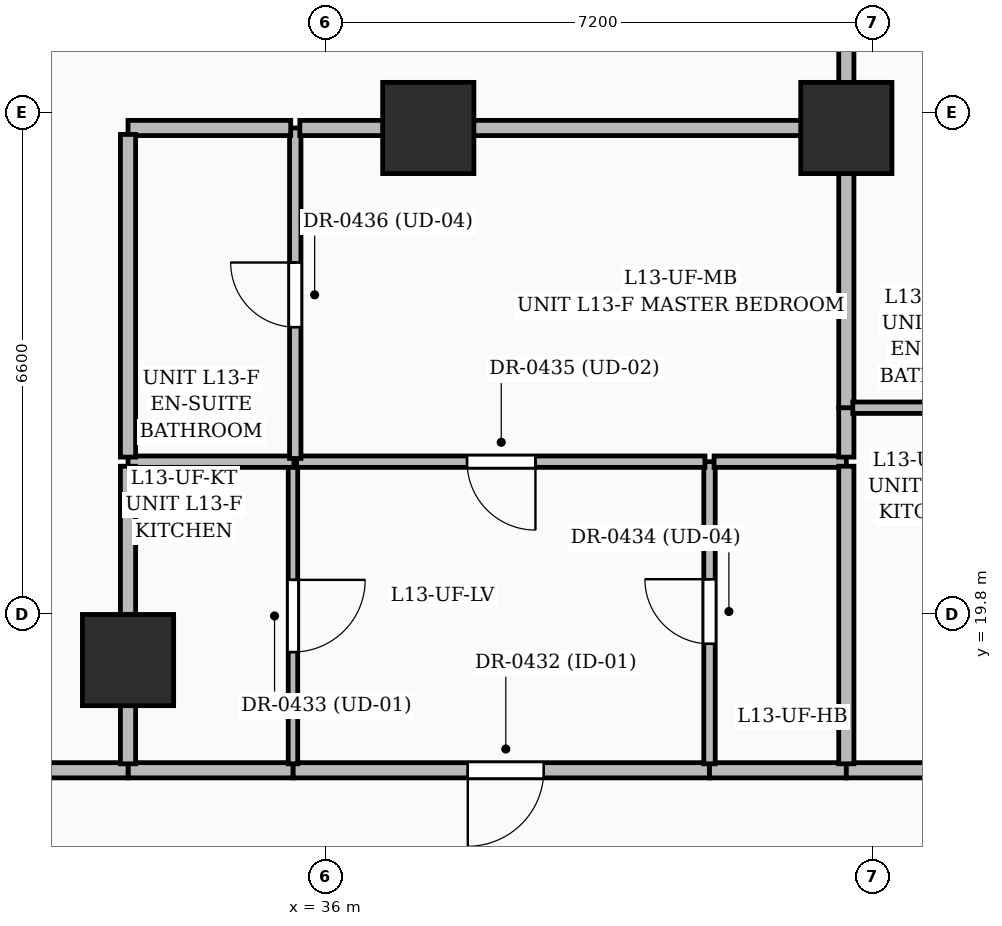
"""IFC4 building model, lengths in metres.
Left out: names, types, materials, properties, quantities, classifications, styles, units other than length and angle.
Written with IfcOpenShell. Run it as: python <this file> out.ifc"""

import sys

from ifc_helpers import new_model, si_unit, direction, frame, frame_2d, origin, origin_2d, place, context, subcontext, project, spatial, rectangle, extrude, element, fill, save


model = new_model("IFC4")
c1 = context("Model", 3, precision=1e-05, world=origin(), true_north=direction((0.0, 1.0)))
c2 = subcontext(c1, "Body", "Model", "MODEL_VIEW")
j1 = project(units=[si_unit("LENGTHUNIT", "METRE"), si_unit("PLANEANGLEUNIT", "RADIAN")], contexts=[c1])
p1 = place(None, origin())
s1 = spatial("IfcSite", under=j1, at=p1, CompositionType="ELEMENT")
p2 = place(p1, origin())
s2 = spatial("IfcBuilding", under=s1, at=p2, CompositionType="ELEMENT")
p3 = place(p2, frame((0.0, 0.0, 57.0)))
s3 = spatial("IfcBuildingStorey", under=s2, at=p3, CompositionType="ELEMENT", Elevation=57.0)
for number, where, z_axis, x_axis in (
    (1, (42.85, 26.2, 0.0), (0.0, 0.0, 1.0), (1.0, 0.0, 0.0)),
    (2, (37.35, 26.2, 0.0), (0.0, 0.0, 1.0), (1.0, 0.0, 0.0)),
    (3, (33.4, 19.2, 0.0), (0.0, 0.0, 1.0), (1.0, 0.0, 0.0)),
):
    element("IfcColumn", number, at=place(p3, frame(where, z_axis=z_axis, x_axis=x_axis)), inside=s3, PredefinedType="COLUMN", context=c2, shape_type="SweptSolid", body=[
        extrude(rectangle(XDim=1.2, YDim=1.2, at=origin_2d()), origin(), (0.0, 0.0, 1.0), 3.6),
    ])
p4 = place(p3, frame((41.05, 17.75, 0.0), z_axis=(0.0, 0.0, 1.0), x_axis=(-1.0, 0.0, 0.0)))
e4 = element("IfcWall", 4, at=p4, inside=s3, PredefinedType="PARTITIONING", context=c2, shape_type="SweptSolid", body=[
    extrude(rectangle(XDim=5.48, YDim=0.2, at=frame_2d((2.74, 0.0))), origin(), (0.0, 0.0, 1.0), 3.35),
])
p5 = place(p4, frame((2.18, 0.0, 0.0)))
e5 = element("IfcOpeningElement", 5, at=p5, cuts=e4, PredefinedType="OPENING", context=c2, shape_type="SweptSolid", body=[
    extrude(rectangle(XDim=1.0, YDim=2.2, at=frame_2d((0.5, 1.1))), frame((0.0, 0.11, 0.0), z_axis=(0.0, -1.0, 0.0), x_axis=(1.0, 0.0, 0.0)), (0.0, 0.0, 1.0), 0.22),
])
p6 = place(p3, frame((42.85, 17.75, 0.0), z_axis=(0.0, 0.0, 1.0), x_axis=(-1.0, 0.0, 0.0)))
e6 = element("IfcWall", 6, at=p6, inside=s3, PredefinedType="PARTITIONING", context=c2, shape_type="SweptSolid", body=[
    extrude(rectangle(XDim=1.8, YDim=0.2, at=frame_2d((0.9, 0.0))), origin(), (0.0, 0.0, 1.0), 3.35),
])
p7 = place(p3, frame((35.57, 17.75, 0.0), z_axis=(0.0, 0.0, 1.0), x_axis=(-1.0, 0.0, 0.0)))
e7 = element("IfcWall", 7, at=p7, inside=s3, PredefinedType="PARTITIONING", context=c2, shape_type="SweptSolid", body=[
    extrude(rectangle(XDim=2.17, YDim=0.2, at=frame_2d((1.085, 0.0))), origin(), (0.0, 0.0, 1.0), 2.309),
])
p8 = place(p3, frame((45.88, 17.75, 0.0), z_axis=(0.0, 0.0, 1.0), x_axis=(-1.0, 0.0, 0.0)))
e8 = element("IfcWall", 8, at=p8, inside=s3, PredefinedType="PARTITIONING", context=c2, shape_type="SweptSolid", body=[
    extrude(rectangle(XDim=3.03, YDim=0.2, at=frame_2d((1.515, 0.0))), origin(), (0.0, 0.0, 1.0), 2.309),
])
p9 = place(p3, frame((33.4, 17.75, 0.0), z_axis=(0.0, 0.0, 1.0), x_axis=(-1.0, 0.0, 0.0)))
e9 = element("IfcWall", 9, at=p9, inside=s3, PredefinedType="PARTITIONING", context=c2, shape_type="SweptSolid", body=[
    extrude(rectangle(XDim=11.915, YDim=0.2, at=frame_2d((5.958, 0.0))), origin(), (0.0, 0.0, 1.0), 2.279),
])
p10 = place(p9, frame((5.49, 0.0, 0.0)))
e10 = element("IfcOpeningElement", 10, at=p10, cuts=e9, PredefinedType="OPENING", context=c2, shape_type="SweptSolid", body=[
    extrude(rectangle(XDim=0.9, YDim=2.1, at=frame_2d((0.45, 1.05))), frame((0.0, 0.11, 0.0), z_axis=(0.0, -1.0, 0.0), x_axis=(1.0, 0.0, 0.0)), (0.0, 0.0, 1.0), 0.22),
])
p11 = place(p3, frame((41.05, 17.835, 0.0), z_axis=(0.0, 0.0, 1.0), x_axis=(0.0, 1.0, 0.0)))
e11 = element("IfcWall", 11, at=p11, inside=s3, PredefinedType="PARTITIONING", context=c2, shape_type="SweptSolid", body=[
    extrude(rectangle(XDim=3.975, YDim=0.15, at=frame_2d((1.988, 0.0))), origin(), (0.0, 0.0, 1.0), 2.853),
])
p12 = place(p11, frame((1.579, 0.0, 0.0)))
e12 = element("IfcOpeningElement", 12, at=p12, cuts=e11, PredefinedType="OPENING", context=c2, shape_type="SweptSolid", body=[
    extrude(rectangle(XDim=0.85, YDim=2.1, at=frame_2d((0.425, 1.05))), frame((0.0, 0.085, 0.0), z_axis=(0.0, -1.0, 0.0), x_axis=(1.0, 0.0, 0.0)), (0.0, 0.0, 1.0), 0.17),
])
p13 = place(p3, frame((35.57, 21.81, 0.0), z_axis=(0.0, 0.0, 1.0), x_axis=(0.0, -1.0, 0.0)))
e13 = element("IfcWall", 13, at=p13, inside=s3, PredefinedType="PARTITIONING", context=c2, shape_type="SweptSolid", body=[
    extrude(rectangle(XDim=3.975, YDim=0.125, at=frame_2d((1.988, 0.0))), origin(), (0.0, 0.0, 1.0), 2.853),
])
p14 = place(p13, frame((1.555, 0.0, 0.0)))
e14 = element("IfcOpeningElement", 14, at=p14, cuts=e13, PredefinedType="OPENING", context=c2, shape_type="SweptSolid", body=[
    extrude(rectangle(XDim=0.95, YDim=2.2, at=frame_2d((0.475, 1.1))), frame((0.0, 0.072, 0.0), z_axis=(0.0, -1.0, 0.0), x_axis=(1.0, 0.0, 0.0)), (0.0, 0.0, 1.0), 0.145),
])
p15 = place(p3, frame((40.99, 21.81, 0.0), z_axis=(0.0, 0.0, 1.0), x_axis=(-1.0, 0.0, 0.0)))
e15 = element("IfcWall", 15, at=p15, inside=s3, PredefinedType="PARTITIONING", context=c2, shape_type="SweptSolid", body=[
    extrude(rectangle(XDim=5.373, YDim=0.15, at=frame_2d((2.686, 0.0))), origin(), (0.0, 0.0, 1.0), 3.35),
])
p16 = place(p15, frame((2.23, 0.0, 0.0)))
e16 = element("IfcOpeningElement", 16, at=p16, cuts=e15, PredefinedType="OPENING", context=c2, shape_type="SweptSolid", body=[
    extrude(rectangle(XDim=0.9, YDim=2.15, at=frame_2d((0.45, 1.075))), frame((0.0, 0.085, 0.0), z_axis=(0.0, -1.0, 0.0), x_axis=(1.0, 0.0, 0.0)), (0.0, 0.0, 1.0), 0.17),
])
p17 = place(p3, frame((42.85, 21.81, 0.0), z_axis=(0.0, 0.0, 1.0), x_axis=(-1.0, 0.0, 0.0)))
e17 = element("IfcWall", 17, at=p17, inside=s3, PredefinedType="PARTITIONING", context=c2, shape_type="SweptSolid", body=[
    extrude(rectangle(XDim=1.74, YDim=0.15, at=frame_2d((0.87, 0.0))), origin(), (0.0, 0.0, 1.0), 3.35),
])
p18 = place(p3, frame((42.85, 17.835, 0.0), z_axis=(0.0, 0.0, 1.0), x_axis=(0.0, 1.0, 0.0)))
e18 = element("IfcWall", 18, at=p18, inside=s3, PredefinedType="PARTITIONING", context=c2, shape_type="SweptSolid", body=[
    extrude(rectangle(XDim=3.915, YDim=0.2, at=frame_2d((1.958, 0.0))), origin(), (0.0, 0.0, 1.0), 2.853),
])
p19 = place(p3, frame((35.583, 21.81, 0.0), z_axis=(0.0, 0.0, 1.0), x_axis=(-1.0, 0.0, 0.0)))
e19 = element("IfcWall", 19, at=p19, inside=s3, PredefinedType="PARTITIONING", context=c2, shape_type="SweptSolid", body=[
    extrude(rectangle(XDim=2.183, YDim=0.15, at=frame_2d((1.091, 0.0))), origin(), (0.0, 0.0, 1.0), 2.309),
])
p20 = place(p3, frame((33.4, 21.75, 0.0), z_axis=(0.0, 0.0, 1.0), x_axis=(0.0, -1.0, 0.0)))
e20 = element("IfcWall", 20, at=p20, inside=s3, PredefinedType="PARTITIONING", context=c2, shape_type="SweptSolid", body=[
    extrude(rectangle(XDim=3.915, YDim=0.2, at=frame_2d((1.958, 0.0))), origin(), (0.0, 0.0, 1.0), 2.309),
])
p21 = place(p3, frame((35.6, 21.853, 0.0), z_axis=(0.0, 0.0, 1.0), x_axis=(0.0, 1.0, 0.0)))
e21 = element("IfcWall", 21, at=p21, inside=s3, PredefinedType="PARTITIONING", context=c2, shape_type="SweptSolid", body=[
    extrude(rectangle(XDim=4.347, YDim=0.15, at=frame_2d((2.174, 0.0))), origin(), (0.0, 0.0, 1.0), 2.309),
])
p22 = place(p21, frame((1.728, 0.0, 0.0)))
e22 = element("IfcOpeningElement", 22, at=p22, cuts=e21, PredefinedType="OPENING", context=c2, shape_type="SweptSolid", body=[
    extrude(rectangle(XDim=0.85, YDim=2.1, at=frame_2d((0.425, 1.05))), frame((0.0, 0.085, 0.0), z_axis=(0.0, -1.0, 0.0), x_axis=(1.0, 0.0, 0.0)), (0.0, 0.0, 1.0), 0.17),
])
p23 = place(p3, frame((42.85, 21.87, 0.0), z_axis=(0.0, 0.0, 1.0), x_axis=(0.0, 1.0, 0.0)))
e23 = element("IfcWall", 23, at=p23, inside=s3, PredefinedType="PARTITIONING", context=c2, shape_type="SweptSolid", body=[
    extrude(rectangle(XDim=0.65, YDim=0.2, at=frame_2d((0.325, 0.0))), origin(), (0.0, 0.0, 1.0), 3.35),
])
p24 = place(p3, frame((42.85, 22.52, 0.0), z_axis=(0.0, 0.0, 1.0), x_axis=(0.0, 1.0, 0.0)))
e24 = element("IfcWall", 24, at=p24, inside=s3, PredefinedType="PARTITIONING", context=c2, shape_type="SweptSolid", body=[
    extrude(rectangle(XDim=3.68, YDim=0.2, at=frame_2d((1.84, 0.0))), origin(), (0.0, 0.0, 1.0), 2.309),
])
p25 = place(p3, frame((42.765, 26.2, 0.0), z_axis=(0.0, 0.0, 1.0), x_axis=(-1.0, 0.0, 0.0)))
e25 = element("IfcWall", 25, at=p25, inside=s3, PredefinedType="PARTITIONING", context=c2, shape_type="SweptSolid", body=[
    extrude(rectangle(XDim=7.105, YDim=0.2, at=frame_2d((3.552, 0.0))), origin(), (0.0, 0.0, 1.0), 2.309),
])
p26 = place(p3, frame((35.54, 26.2, 0.0), z_axis=(0.0, 0.0, 1.0), x_axis=(-1.0, 0.0, 0.0)))
e26 = element("IfcWall", 26, at=p26, inside=s3, PredefinedType="PARTITIONING", context=c2, shape_type="SweptSolid", body=[
    extrude(rectangle(XDim=2.14, YDim=0.2, at=frame_2d((1.07, 0.0))), origin(), (0.0, 0.0, 1.0), 2.709),
])
p27 = place(p3, frame((33.4, 26.115, 0.0), z_axis=(0.0, 0.0, 1.0), x_axis=(0.0, -1.0, 0.0)))
e27 = element("IfcWall", 27, at=p27, inside=s3, PredefinedType="PARTITIONING", context=c2, shape_type="SweptSolid", body=[
    extrude(rectangle(XDim=4.245, YDim=0.2, at=frame_2d((2.123, 0.0))), origin(), (0.0, 0.0, 1.0), 2.709),
])
p28 = place(p3, frame((45.09, 22.52, 0.0), z_axis=(0.0, 0.0, 1.0), x_axis=(-1.0, 0.0, 0.0)))
e28 = element("IfcWall", 28, at=p28, inside=s3, PredefinedType="PARTITIONING", context=c2, shape_type="SweptSolid", body=[
    extrude(rectangle(XDim=2.155, YDim=0.15, at=frame_2d((1.078, 0.0))), origin(), (0.0, 0.0, 1.0), 2.309),
])
p29 = place(p3, frame((42.85, 27.69, 0.0), z_axis=(0.0, 0.0, 1.0), x_axis=(0.0, -1.0, 0.0)))
e29 = element("IfcWall", 29, at=p29, inside=s3, PredefinedType="PARTITIONING", context=c2, shape_type="SweptSolid", body=[
    extrude(rectangle(XDim=1.49, YDim=0.2, at=frame_2d((0.745, 0.0))), origin(), (0.0, 0.0, 1.0), 2.279),
])
p30 = place(p5, origin())
e30 = element("IfcDoor", 30, at=p30, inside=s3, OperationType="SINGLE_SWING_RIGHT", PredefinedType="DOOR", context=c2, shape_type="SweptSolid", body=[
    extrude(rectangle(XDim=1.0, YDim=2.2, at=frame_2d((0.5, 1.1))), frame((0.0, 0.025, 0.0), z_axis=(0.0, -1.0, 0.0), x_axis=(1.0, 0.0, 0.0)), (0.0, 0.0, 1.0), 0.05),
])
fill(e5, e30)
p31 = place(p14, origin())
e31 = element("IfcDoor", 31, at=p31, inside=s3, OperationType="SINGLE_SWING_LEFT", PredefinedType="DOOR", context=c2, shape_type="SweptSolid", body=[
    extrude(rectangle(XDim=0.95, YDim=2.2, at=frame_2d((0.475, 1.1))), frame((0.0, 0.025, 0.0), z_axis=(0.0, -1.0, 0.0), x_axis=(1.0, 0.0, 0.0)), (0.0, 0.0, 1.0), 0.05),
])
fill(e14, e31)
p32 = place(p12, origin())
e32 = element("IfcDoor", 32, at=p32, inside=s3, OperationType="SINGLE_SWING_RIGHT", PredefinedType="DOOR", context=c2, shape_type="SweptSolid", body=[
    extrude(rectangle(XDim=0.85, YDim=2.1, at=frame_2d((0.425, 1.05))), frame((0.0, 0.025, 0.0), z_axis=(0.0, -1.0, 0.0), x_axis=(1.0, 0.0, 0.0)), (0.0, 0.0, 1.0), 0.05),
])
fill(e12, e32)
p33 = place(p16, origin())
e33 = element("IfcDoor", 33, at=p33, inside=s3, OperationType="SINGLE_SWING_LEFT", PredefinedType="DOOR", context=c2, shape_type="SweptSolid", body=[
    extrude(rectangle(XDim=0.9, YDim=2.15, at=frame_2d((0.45, 1.075))), frame((0.0, 0.025, 0.0), z_axis=(0.0, -1.0, 0.0), x_axis=(1.0, 0.0, 0.0)), (0.0, 0.0, 1.0), 0.05),
])
fill(e16, e33)
p34 = place(p22, origin())
e34 = element("IfcDoor", 34, at=p34, inside=s3, OperationType="SINGLE_SWING_RIGHT", PredefinedType="DOOR", context=c2, shape_type="SweptSolid", body=[
    extrude(rectangle(XDim=0.85, YDim=2.1, at=frame_2d((0.425, 1.05))), frame((0.0, 0.025, 0.0), z_axis=(0.0, -1.0, 0.0), x_axis=(1.0, 0.0, 0.0)), (0.0, 0.0, 1.0), 0.05),
])
fill(e22, e34)
save(model, sys.argv[1])
